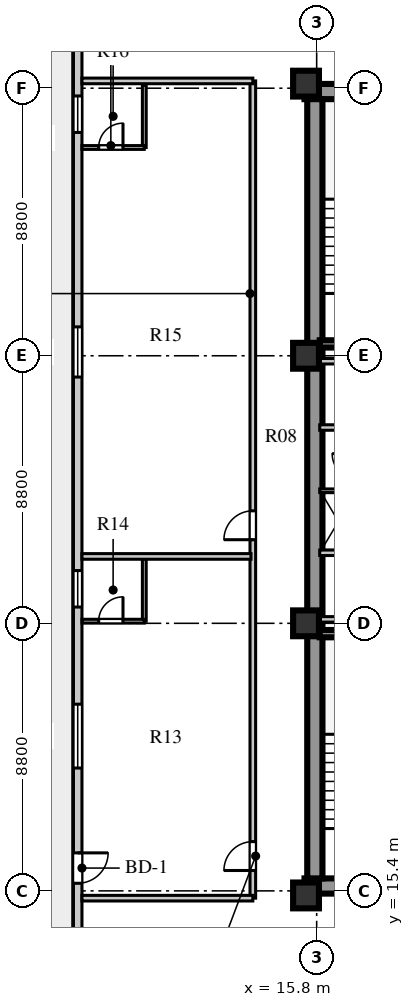
"""IFC4 building model, lengths in metres.
Left out: names, types, materials, properties, quantities, classifications, styles, units other than length and angle.
Written with IfcOpenShell. Run it as: python <this file> out.ifc"""

import sys

from ifc_helpers import new_model, si_unit, direction, frame, frame_2d, origin, origin_2d, place, context, subcontext, project, spatial, rectangle, extrude, element, fill, save


model = new_model("IFC4")
c1 = context("Model", 3, precision=1e-05, world=origin(), true_north=direction((0.0, 1.0)))
c2 = subcontext(c1, "Body", "Model", "MODEL_VIEW")
j1 = project(units=[si_unit("LENGTHUNIT", "METRE"), si_unit("PLANEANGLEUNIT", "RADIAN")], contexts=[c1])
p1 = place(None, origin())
s1 = spatial("IfcSite", under=j1, at=p1, CompositionType="ELEMENT")
p2 = place(p1, origin())
s2 = spatial("IfcBuilding", under=s1, at=p2, CompositionType="ELEMENT")
p3 = place(p2, frame((0.0, 0.0, 157.9)))
s3 = spatial("IfcBuildingStorey", under=s2, at=p3, CompositionType="ELEMENT", Elevation=157.9)
for number, where, z_axis, x_axis in (
    (1, (15.4, 15.56, 0.0), (0.0, 0.0, 1.0), (1.0, 0.0, 0.0)),
    (2, (15.4, 41.69, 0.0), (0.0, 0.0, 1.0), (1.0, 0.0, 0.0)),
):
    element("IfcWall", number, at=place(p3, frame(where, z_axis=z_axis, x_axis=x_axis)), inside=s3, PredefinedType="SHEAR", context=c2, shape_type="SweptSolid", body=[
        extrude(rectangle(XDim=9.68, YDim=0.5, at=frame_2d((4.84, 0.0))), origin(), (0.0, 0.0, 1.0), 3.6),
    ])
p4 = place(p3, frame((15.74, 15.81, 0.0), z_axis=(0.0, 0.0, 1.0), x_axis=(0.0, 1.0, 0.0)))
e3 = element("IfcWall", 3, at=p4, inside=s3, PredefinedType="SHEAR", context=c2, shape_type="SweptSolid", body=[
    extrude(rectangle(XDim=25.63, YDim=0.5, at=frame_2d((12.815, 0.0))), origin(), (0.0, 0.0, 1.0), 3.6),
])
for number, where, z_axis, x_axis in (
    (4, (15.45, 15.25, 0.0), (0.0, 0.0, 1.0), (1.0, 0.0, 0.0)),
    (5, (15.45, 24.2, 0.0), (0.0, 0.0, 1.0), (1.0, 0.0, 0.0)),
    (6, (15.45, 33.0, 0.0), (0.0, 0.0, 1.0), (1.0, 0.0, 0.0)),
    (7, (15.45, 41.95, 0.0), (0.0, 0.0, 1.0), (1.0, 0.0, 0.0)),
):
    element("IfcColumn", number, at=place(p3, frame(where, z_axis=z_axis, x_axis=x_axis)), inside=s3, PredefinedType="COLUMN", context=c2, shape_type="SweptSolid", body=[
        extrude(rectangle(XDim=0.85, YDim=0.85, at=origin_2d()), origin(), (0.0, 0.0, 1.0), 3.6),
    ])
p5 = place(p3, frame((7.94, 44.07, 0.0), z_axis=(0.0, 0.0, 1.0), x_axis=(0.0, -1.0, 0.0)))
e8 = element("IfcWall", 8, at=p5, inside=s3, PredefinedType="STANDARD", context=c2, shape_type="SweptSolid", body=[
    extrude(rectangle(XDim=30.94, YDim=0.28, at=frame_2d((15.47, 0.0))), origin(), (0.0, 0.0, 1.0), 3.6),
])
p6 = place(p5, frame((27.42, 0.0, 0.0)))
e9 = element("IfcOpeningElement", 9, at=p6, cuts=e8, PredefinedType="OPENING", context=c2, shape_type="SweptSolid", body=[
    extrude(rectangle(XDim=1.0, YDim=2.05, at=frame_2d((0.5, 1.025))), frame((0.0, 0.15, 0.0), z_axis=(0.0, -1.0, 0.0), x_axis=(1.0, 0.0, 0.0)), (0.0, 0.0, 1.0), 0.3),
])
p7 = place(p5, frame((22.53, 0.0, 0.8)))
e10 = element("IfcOpeningElement", 10, at=p7, cuts=e8, PredefinedType="OPENING", context=c2, shape_type="SweptSolid", body=[
    extrude(rectangle(XDim=2.1, YDim=1.95, at=frame_2d((1.05, 0.975))), frame((0.0, 0.15, 0.0), z_axis=(0.0, -1.0, 0.0), x_axis=(1.0, 0.0, 0.0)), (0.0, 0.0, 1.0), 0.3),
])
p8 = place(p5, frame((18.135, 0.0, 0.8)))
e11 = element("IfcOpeningElement", 11, at=p8, cuts=e8, PredefinedType="OPENING", context=c2, shape_type="SweptSolid", body=[
    extrude(rectangle(XDim=1.2, YDim=1.75, at=frame_2d((0.6, 0.875))), frame((0.0, 0.15, 0.0), z_axis=(0.0, -1.0, 0.0), x_axis=(1.0, 0.0, 0.0)), (0.0, 0.0, 1.0), 0.3),
])
p9 = place(p5, frame((10.12, 0.0, 0.8)))
e12 = element("IfcOpeningElement", 12, at=p9, cuts=e8, PredefinedType="OPENING", context=c2, shape_type="SweptSolid", body=[
    extrude(rectangle(XDim=1.65, YDim=1.95, at=frame_2d((0.825, 0.975))), frame((0.0, 0.15, 0.0), z_axis=(0.0, -1.0, 0.0), x_axis=(1.0, 0.0, 0.0)), (0.0, 0.0, 1.0), 0.3),
])
p10 = place(p5, frame((2.525, 0.0, 0.8)))
e13 = element("IfcOpeningElement", 13, at=p10, cuts=e8, PredefinedType="OPENING", context=c2, shape_type="SweptSolid", body=[
    extrude(rectangle(XDim=1.2, YDim=1.75, at=frame_2d((0.6, 0.875))), frame((0.0, 0.15, 0.0), z_axis=(0.0, -1.0, 0.0), x_axis=(1.0, 0.0, 0.0)), (0.0, 0.0, 1.0), 0.3),
])
p11 = place(p3, frame((15.9, 23.86, 0.0), z_axis=(0.0, 0.0, 1.0), x_axis=(1.0, 0.0, 0.0)))
e14 = element("IfcWall", 14, at=p11, inside=s3, PredefinedType="SHEAR", context=c2, shape_type="SweptSolid", body=[
    extrude(rectangle(XDim=3.52, YDim=0.24, at=frame_2d((1.76, 0.0))), origin(), (0.0, 0.0, 1.0), 3.85),
])
p12 = place(p3, frame((15.9, 26.52, 0.0), z_axis=(0.0, 0.0, 1.0), x_axis=(1.0, 0.0, 0.0)))
e15 = element("IfcWall", 15, at=p12, inside=s3, PredefinedType="SOLIDWALL", context=c2, shape_type="SweptSolid", body=[
    extrude(rectangle(XDim=8.68, YDim=0.18, at=frame_2d((4.34, 0.0))), origin(), (0.0, 0.0, 1.0), 3.6),
])
p13 = place(p12, frame((2.05, 0.0, 0.0)))
e16 = element("IfcOpeningElement", 16, at=p13, cuts=e15, PredefinedType="OPENING", context=c2, shape_type="SweptSolid", body=[
    extrude(rectangle(XDim=0.85, YDim=2.06, at=frame_2d((0.425, 1.03))), frame((0.0, 0.1, 0.0), z_axis=(0.0, -1.0, 0.0), x_axis=(1.0, 0.0, 0.0)), (0.0, 0.0, 1.0), 0.2),
])
p14 = place(p12, frame((5.2, 0.0, 0.0)))
e17 = element("IfcOpeningElement", 17, at=p14, cuts=e15, PredefinedType="OPENING", context=c2, shape_type="SweptSolid", body=[
    extrude(rectangle(XDim=0.95, YDim=2.1, at=frame_2d((0.475, 1.05))), frame((0.0, 0.1, 0.0), z_axis=(0.0, -1.0, 0.0), x_axis=(1.0, 0.0, 0.0)), (0.0, 0.0, 1.0), 0.2),
])
p15 = place(p3, frame((15.9, 24.33, 0.0), z_axis=(0.0, 0.0, 1.0), x_axis=(1.0, 0.0, 0.0)))
e18 = element("IfcWall", 18, at=p15, inside=s3, PredefinedType="SOLIDWALL", context=c2, shape_type="SweptSolid", body=[
    extrude(rectangle(XDim=8.68, YDim=0.18, at=frame_2d((4.34, 0.0))), origin(), (0.0, 0.0, 1.0), 2.95),
])
p16 = place(p3, frame((15.9, 28.56, 0.0), z_axis=(0.0, 0.0, 1.0), x_axis=(1.0, 0.0, 0.0)))
e19 = element("IfcWall", 19, at=p16, inside=s3, PredefinedType="PARTITIONING", context=c2, shape_type="SweptSolid", body=[
    extrude(rectangle(XDim=1.2, YDim=0.12, at=frame_2d((0.6, 0.0))), origin(), (0.0, 0.0, 1.0), 3.6),
])
p17 = place(p3, frame((15.9, 30.64, 0.0), z_axis=(0.0, 0.0, 1.0), x_axis=(1.0, 0.0, 0.0)))
e20 = element("IfcWall", 20, at=p17, inside=s3, PredefinedType="SOLIDWALL", context=c2, shape_type="SweptSolid", body=[
    extrude(rectangle(XDim=8.68, YDim=0.18, at=frame_2d((4.34, 0.0))), origin(), (0.0, 0.0, 1.0), 3.6),
])
p18 = place(p17, frame((1.76, 0.0, 0.0)))
e21 = element("IfcOpeningElement", 21, at=p18, cuts=e20, PredefinedType="OPENING", context=c2, shape_type="SweptSolid", body=[
    extrude(rectangle(XDim=1.0, YDim=2.1, at=frame_2d((0.5, 1.05))), frame((0.0, 0.1, 0.0), z_axis=(0.0, -1.0, 0.0), x_axis=(1.0, 0.0, 0.0)), (0.0, 0.0, 1.0), 0.2),
])
p19 = place(p17, frame((3.6, 0.0, 0.0)))
e22 = element("IfcOpeningElement", 22, at=p19, cuts=e20, PredefinedType="OPENING", context=c2, shape_type="SweptSolid", body=[
    extrude(rectangle(XDim=1.0, YDim=2.1, at=frame_2d((0.5, 1.05))), frame((0.0, 0.1, 0.0), z_axis=(0.0, -1.0, 0.0), x_axis=(1.0, 0.0, 0.0)), (0.0, 0.0, 1.0), 0.2),
])
p20 = place(p17, frame((5.44, 0.0, 0.0)))
e23 = element("IfcOpeningElement", 23, at=p20, cuts=e20, PredefinedType="OPENING", context=c2, shape_type="SweptSolid", body=[
    extrude(rectangle(XDim=1.0, YDim=2.1, at=frame_2d((0.5, 1.05))), frame((0.0, 0.1, 0.0), z_axis=(0.0, -1.0, 0.0), x_axis=(1.0, 0.0, 0.0)), (0.0, 0.0, 1.0), 0.2),
])
p21 = place(p17, frame((7.28, 0.0, 0.0)))
e24 = element("IfcOpeningElement", 24, at=p21, cuts=e20, PredefinedType="OPENING", context=c2, shape_type="SweptSolid", body=[
    extrude(rectangle(XDim=1.0, YDim=2.1, at=frame_2d((0.5, 1.05))), frame((0.0, 0.1, 0.0), z_axis=(0.0, -1.0, 0.0), x_axis=(1.0, 0.0, 0.0)), (0.0, 0.0, 1.0), 0.2),
])
p22 = place(p3, frame((15.9, 32.82, 0.0), z_axis=(0.0, 0.0, 1.0), x_axis=(1.0, 0.0, 0.0)))
e25 = element("IfcWall", 25, at=p22, inside=s3, PredefinedType="SOLIDWALL", context=c2, shape_type="SweptSolid", body=[
    extrude(rectangle(XDim=8.68, YDim=0.18, at=frame_2d((4.34, 0.0))), origin(), (0.0, 0.0, 1.0), 2.95),
])
p23 = place(p3, frame((15.9, 33.39, 0.0), z_axis=(0.0, 0.0, 1.0), x_axis=(1.0, 0.0, 0.0)))
e26 = element("IfcWall", 26, at=p23, inside=s3, PredefinedType="SHEAR", context=c2, shape_type="SweptSolid", body=[
    extrude(rectangle(XDim=3.52, YDim=0.24, at=frame_2d((1.76, 0.0))), origin(), (0.0, 0.0, 1.0), 3.85),
])
p24 = place(p3, frame((13.7, 15.16, 0.0), z_axis=(0.0, 0.0, 1.0), x_axis=(0.0, 1.0, 0.0)))
e27 = element("IfcWall", 27, at=p24, inside=s3, PredefinedType="SOLIDWALL", context=c2, shape_type="SweptSolid", body=[
    extrude(rectangle(XDim=26.88, YDim=0.185, at=frame_2d((13.44, 0.0))), origin(), (0.0, 0.0, 1.0), 3.6),
])
p25 = place(p24, frame((0.91, 0.0, 0.0)))
e28 = element("IfcOpeningElement", 28, at=p25, cuts=e27, PredefinedType="OPENING", context=c2, shape_type="SweptSolid", body=[
    extrude(rectangle(XDim=0.95, YDim=2.1, at=frame_2d((0.475, 1.05))), frame((0.0, 0.103, 0.0), z_axis=(0.0, -1.0, 0.0), x_axis=(1.0, 0.0, 0.0)), (0.0, 0.0, 1.0), 0.205),
])
p26 = place(p24, frame((11.79, 0.0, 0.0)))
e29 = element("IfcOpeningElement", 29, at=p26, cuts=e27, PredefinedType="OPENING", context=c2, shape_type="SweptSolid", body=[
    extrude(rectangle(XDim=0.95, YDim=2.1, at=frame_2d((0.475, 1.05))), frame((0.0, 0.103, 0.0), z_axis=(0.0, -1.0, 0.0), x_axis=(1.0, 0.0, 0.0)), (0.0, 0.0, 1.0), 0.205),
])
for number, where, z_axis, x_axis in (
    (30, (8.08, 15.16, 0.0), (0.0, 0.0, 1.0), (1.0, 0.0, 0.0)),
    (31, (8.08, 42.04, 0.0), (0.0, 0.0, 1.0), (1.0, 0.0, 0.0)),
):
    element("IfcWall", number, at=place(p3, frame(where, z_axis=z_axis, x_axis=x_axis)), inside=s3, PredefinedType="SOLIDWALL", context=c2, shape_type="SweptSolid", body=[
        extrude(rectangle(XDim=5.62, YDim=0.185, at=frame_2d((2.81, 0.0))), origin(), (0.0, 0.0, 1.0), 3.15),
    ])
p27 = place(p3, frame((10.13, 24.27, 0.0), z_axis=(0.0, 0.0, 1.0), x_axis=(0.0, 1.0, 0.0)))
e32 = element("IfcWall", 32, at=p27, inside=s3, PredefinedType="PLUMBINGWALL", context=c2, shape_type="SweptSolid", body=[
    extrude(rectangle(XDim=2.05, YDim=0.125, at=frame_2d((1.025, 0.0))), origin(), (0.0, 0.0, 1.0), 3.6),
])
p28 = place(p3, frame((8.08, 24.27, 0.0), z_axis=(0.0, 0.0, 1.0), x_axis=(1.0, 0.0, 0.0)))
e33 = element("IfcWall", 33, at=p28, inside=s3, PredefinedType="PLUMBINGWALL", context=c2, shape_type="SweptSolid", body=[
    extrude(rectangle(XDim=2.05, YDim=0.125, at=frame_2d((1.025, 0.0))), origin(), (0.0, 0.0, 1.0), 3.15),
])
p29 = place(p28, frame((0.55, 0.0, 0.0)))
e34 = element("IfcOpeningElement", 34, at=p29, cuts=e33, PredefinedType="OPENING", context=c2, shape_type="SweptSolid", body=[
    extrude(rectangle(XDim=0.8, YDim=2.05, at=frame_2d((0.4, 1.025))), frame((0.0, 0.073, 0.0), z_axis=(0.0, -1.0, 0.0), x_axis=(1.0, 0.0, 0.0)), (0.0, 0.0, 1.0), 0.145),
])
p30 = place(p3, frame((8.08, 26.4, 0.0), z_axis=(0.0, 0.0, 1.0), x_axis=(1.0, 0.0, 0.0)))
e35 = element("IfcWall", 35, at=p30, inside=s3, PredefinedType="SOLIDWALL", context=c2, shape_type="SweptSolid", body=[
    extrude(rectangle(XDim=5.56, YDim=0.185, at=frame_2d((2.78, 0.0))), origin(), (0.0, 0.0, 1.0), 3.6),
])
p31 = place(p3, frame((10.13, 39.85, 0.0), z_axis=(0.0, 0.0, 1.0), x_axis=(0.0, 1.0, 0.0)))
e36 = element("IfcWall", 36, at=p31, inside=s3, PredefinedType="PLUMBINGWALL", context=c2, shape_type="SweptSolid", body=[
    extrude(rectangle(XDim=2.05, YDim=0.125, at=frame_2d((1.025, 0.0))), origin(), (0.0, 0.0, 1.0), 3.6),
])
p32 = place(p3, frame((8.08, 39.85, 0.0), z_axis=(0.0, 0.0, 1.0), x_axis=(1.0, 0.0, 0.0)))
e37 = element("IfcWall", 37, at=p32, inside=s3, PredefinedType="PLUMBINGWALL", context=c2, shape_type="SweptSolid", body=[
    extrude(rectangle(XDim=2.05, YDim=0.125, at=frame_2d((1.025, 0.0))), origin(), (0.0, 0.0, 1.0), 3.6),
])
p33 = place(p32, frame((0.55, 0.0, 0.0)))
e38 = element("IfcOpeningElement", 38, at=p33, cuts=e37, PredefinedType="OPENING", context=c2, shape_type="SweptSolid", body=[
    extrude(rectangle(XDim=0.8, YDim=2.05, at=frame_2d((0.4, 1.025))), frame((0.0, 0.073, 0.0), z_axis=(0.0, -1.0, 0.0), x_axis=(1.0, 0.0, 0.0)), (0.0, 0.0, 1.0), 0.145),
])
p34 = place(p6, frame((1.0, 0.0, 0.0), z_axis=(0.0, 0.0, 1.0), x_axis=(-1.0, 0.0, 0.0)))
e39 = element("IfcDoor", 39, at=p34, inside=s3, OperationType="SINGLE_SWING_RIGHT", PredefinedType="DOOR", context=c2, shape_type="SweptSolid", body=[
    extrude(rectangle(XDim=1.0, YDim=2.05, at=frame_2d((0.5, 1.025))), frame((0.0, 0.025, 0.0), z_axis=(0.0, -1.0, 0.0), x_axis=(1.0, 0.0, 0.0)), (0.0, 0.0, 1.0), 0.05),
])
fill(e9, e39)
p35 = place(p7, origin())
e40 = element("IfcWindow", 40, at=p35, inside=s3, PartitioningType="SINGLE_PANEL", PredefinedType="WINDOW", context=c2, shape_type="SweptSolid", body=[
    extrude(rectangle(XDim=2.1, YDim=1.95, at=frame_2d((1.05, 0.975))), frame((0.0, 0.03, 0.0), z_axis=(0.0, -1.0, 0.0), x_axis=(1.0, 0.0, 0.0)), (0.0, 0.0, 1.0), 0.06),
])
fill(e10, e40)
p36 = place(p8, origin())
e41 = element("IfcWindow", 41, at=p36, inside=s3, PartitioningType="SINGLE_PANEL", PredefinedType="WINDOW", context=c2, shape_type="SweptSolid", body=[
    extrude(rectangle(XDim=1.2, YDim=1.75, at=frame_2d((0.6, 0.875))), frame((0.0, 0.03, 0.0), z_axis=(0.0, -1.0, 0.0), x_axis=(1.0, 0.0, 0.0)), (0.0, 0.0, 1.0), 0.06),
])
fill(e11, e41)
p37 = place(p9, origin())
e42 = element("IfcWindow", 42, at=p37, inside=s3, PartitioningType="SINGLE_PANEL", PredefinedType="WINDOW", context=c2, shape_type="SweptSolid", body=[
    extrude(rectangle(XDim=1.65, YDim=1.95, at=frame_2d((0.825, 0.975))), frame((0.0, 0.03, 0.0), z_axis=(0.0, -1.0, 0.0), x_axis=(1.0, 0.0, 0.0)), (0.0, 0.0, 1.0), 0.06),
])
fill(e12, e42)
p38 = place(p10, origin())
e43 = element("IfcWindow", 43, at=p38, inside=s3, PartitioningType="SINGLE_PANEL", PredefinedType="WINDOW", context=c2, shape_type="SweptSolid", body=[
    extrude(rectangle(XDim=1.2, YDim=1.75, at=frame_2d((0.6, 0.875))), frame((0.0, 0.03, 0.0), z_axis=(0.0, -1.0, 0.0), x_axis=(1.0, 0.0, 0.0)), (0.0, 0.0, 1.0), 0.06),
])
fill(e13, e43)
p39 = place(p25, origin())
e44 = element("IfcDoor", 44, at=p39, inside=s3, OperationType="SINGLE_SWING_LEFT", PredefinedType="DOOR", context=c2, shape_type="SweptSolid", body=[
    extrude(rectangle(XDim=0.95, YDim=2.1, at=frame_2d((0.475, 1.05))), frame((0.0, 0.025, 0.0), z_axis=(0.0, -1.0, 0.0), x_axis=(1.0, 0.0, 0.0)), (0.0, 0.0, 1.0), 0.05),
])
fill(e28, e44)
p40 = place(p29, frame((0.8, 0.0, 0.0), z_axis=(0.0, 0.0, 1.0), x_axis=(-1.0, 0.0, 0.0)))
e45 = element("IfcDoor", 45, at=p40, inside=s3, OperationType="SINGLE_SWING_LEFT", PredefinedType="DOOR", context=c2, shape_type="SweptSolid", body=[
    extrude(rectangle(XDim=0.8, YDim=2.05, at=frame_2d((0.4, 1.025))), frame((0.0, 0.025, 0.0), z_axis=(0.0, -1.0, 0.0), x_axis=(1.0, 0.0, 0.0)), (0.0, 0.0, 1.0), 0.05),
])
fill(e34, e45)
p41 = place(p26, origin())
e46 = element("IfcDoor", 46, at=p41, inside=s3, OperationType="SINGLE_SWING_LEFT", PredefinedType="DOOR", context=c2, shape_type="SweptSolid", body=[
    extrude(rectangle(XDim=0.95, YDim=2.1, at=frame_2d((0.475, 1.05))), frame((0.0, 0.025, 0.0), z_axis=(0.0, -1.0, 0.0), x_axis=(1.0, 0.0, 0.0)), (0.0, 0.0, 1.0), 0.05),
])
fill(e29, e46)
p42 = place(p33, frame((0.8, 0.0, 0.0), z_axis=(0.0, 0.0, 1.0), x_axis=(-1.0, 0.0, 0.0)))
e47 = element("IfcDoor", 47, at=p42, inside=s3, OperationType="SINGLE_SWING_LEFT", PredefinedType="DOOR", context=c2, shape_type="SweptSolid", body=[
    extrude(rectangle(XDim=0.8, YDim=2.05, at=frame_2d((0.4, 1.025))), frame((0.0, 0.025, 0.0), z_axis=(0.0, -1.0, 0.0), x_axis=(1.0, 0.0, 0.0)), (0.0, 0.0, 1.0), 0.05),
])
fill(e38, e47)
save(model, sys.argv[1])
